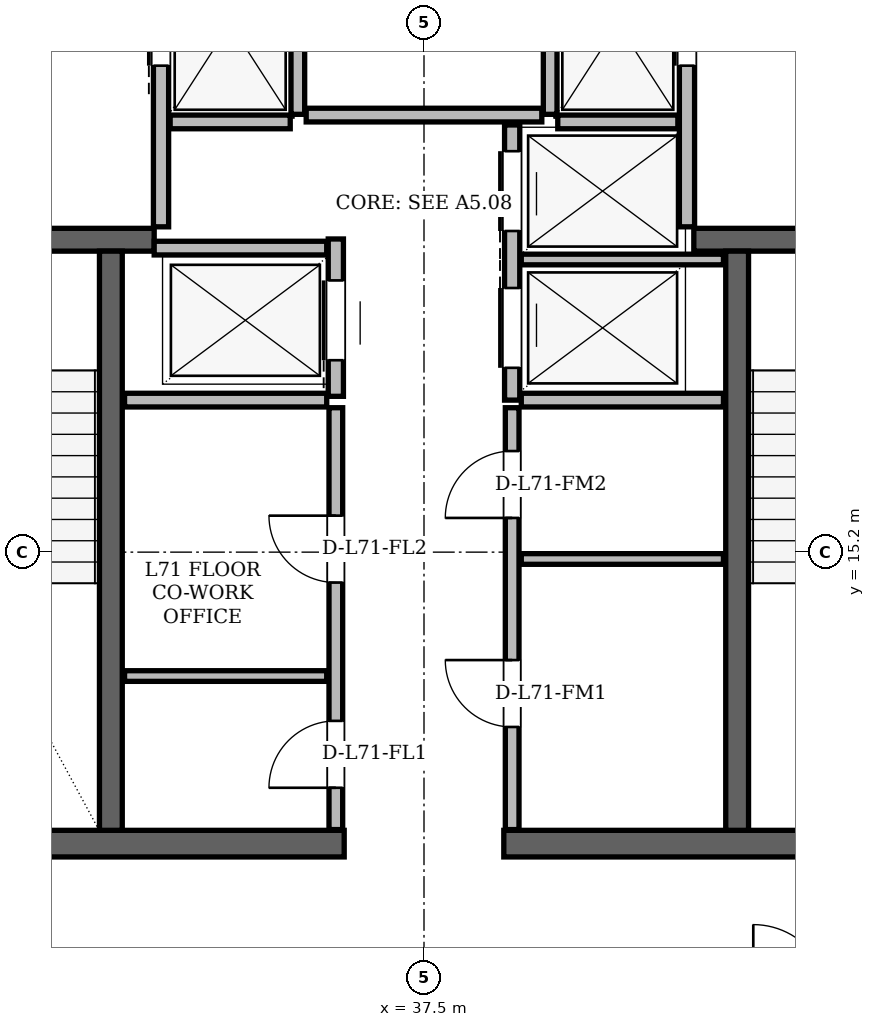
"""IFC4 building model, lengths in metres.
Left out: names, types, materials, properties, quantities, classifications, styles, units other than length and angle.
Written with IfcOpenShell. Run it as: python <this file> out.ifc"""

import sys

from ifc_helpers import new_model, si_unit, direction, frame, frame_2d, origin, place, context, subcontext, project, spatial, rectangle, extrude, element, fill, save


model = new_model("IFC4")
c1 = context("Model", 3, precision=1e-05, world=origin(), true_north=direction((0.0, 1.0)))
c2 = subcontext(c1, "Body", "Model", "MODEL_VIEW")
j1 = project(units=[si_unit("LENGTHUNIT", "METRE"), si_unit("PLANEANGLEUNIT", "RADIAN")], contexts=[c1])
p1 = place(None, origin())
s1 = spatial("IfcSite", under=j1, at=p1, CompositionType="ELEMENT")
p2 = place(p1, origin())
s2 = spatial("IfcBuilding", under=s1, at=p2, CompositionType="ELEMENT")
p3 = place(p2, frame((0.0, 0.0, 269.4)))
s3 = spatial("IfcBuildingStorey", under=s2, at=p3, CompositionType="ELEMENT", Elevation=269.4)
for number, where, z_axis, x_axis in (
    (1, (29.35, 11.365, 0.0), (0.0, 0.0, 1.0), (1.0, 0.0, 0.0)),
    (2, (38.55, 11.365, 0.0), (0.0, 0.0, 1.0), (1.0, 0.0, 0.0)),
):
    element("IfcWall", number, at=place(p3, frame(where, z_axis=z_axis, x_axis=x_axis)), inside=s3, PredefinedType="SHEAR", context=c2, shape_type="SweptSolid", body=[
        extrude(rectangle(XDim=7.1, YDim=0.35, at=frame_2d((3.55, 0.0))), origin(), (0.0, 0.0, 1.0), 3.68),
    ])
p4 = place(p3, frame((29.94, 19.31, 0.0), z_axis=(0.0, 0.0, 1.0), x_axis=(1.0, 0.0, 0.0)))
e3 = element("IfcWall", 3, at=p4, inside=s3, PredefinedType="SHEAR", context=c2, shape_type="SweptSolid", body=[
    extrude(rectangle(XDim=4.01, YDim=0.3, at=frame_2d((2.005, 0.0))), origin(), (0.0, 0.0, 1.0), 3.68),
])
p5 = place(p4, frame((1.01, 0.0, 0.0)))
e4 = element("IfcOpeningElement", 4, at=p5, cuts=e3, PredefinedType="OPENING", context=c2, shape_type="SweptSolid", body=[
    extrude(rectangle(XDim=1.4, YDim=2.2, at=frame_2d((0.7, 1.1))), frame((0.0, 0.15, 0.0), z_axis=(0.0, -1.0, 0.0), x_axis=(1.0, 0.0, 0.0)), (0.0, 0.0, 1.0), 0.3),
])
p6 = place(p3, frame((41.05, 19.31, 0.0), z_axis=(0.0, 0.0, 1.0), x_axis=(1.0, 0.0, 0.0)))
e5 = element("IfcWall", 5, at=p6, inside=s3, PredefinedType="SHEAR", context=c2, shape_type="SweptSolid", body=[
    extrude(rectangle(XDim=4.01, YDim=0.3, at=frame_2d((2.005, 0.0))), origin(), (0.0, 0.0, 1.0), 3.68),
])
p7 = place(p6, frame((1.6, 0.0, 0.0)))
e6 = element("IfcOpeningElement", 6, at=p7, cuts=e5, PredefinedType="OPENING", context=c2, shape_type="SweptSolid", body=[
    extrude(rectangle(XDim=1.4, YDim=2.2, at=frame_2d((0.7, 1.1))), frame((0.0, 0.15, 0.0), z_axis=(0.0, -1.0, 0.0), x_axis=(1.0, 0.0, 0.0)), (0.0, 0.0, 1.0), 0.3),
])
for number, where, z_axis, x_axis in (
    (7, (33.38, 11.54, 0.0), (0.0, 0.0, 1.0), (0.0, 1.0, 0.0)),
    (8, (41.62, 11.54, 0.0), (0.0, 0.0, 1.0), (0.0, 1.0, 0.0)),
):
    element("IfcWall", number, at=place(p3, frame(where, z_axis=z_axis, x_axis=x_axis)), inside=s3, PredefinedType="SHEAR", context=c2, shape_type="SweptSolid", body=[
        extrude(rectangle(XDim=7.62, YDim=0.3, at=frame_2d((3.81, 0.0))), origin(), (0.0, 0.0, 1.0), 3.68),
    ])
p8 = place(p3, frame((58.572, 10.733, 0.0), z_axis=(0.0, 0.0, 1.0), x_axis=(-0.500001430823, 0.866024577697, 0.0)))
e9 = element("IfcWall", 9, at=p8, inside=s3, PredefinedType="SOLIDWALL", context=c2, shape_type="SweptSolid", body=[
    extrude(rectangle(XDim=37.296, YDim=0.29, at=frame_2d((18.648, 0.0))), origin(), (0.0, 0.0, 1.0), 3.058),
])
p9 = place(p8, frame((8.454, 0.0, 0.0)))
e10 = element("IfcOpeningElement", 10, at=p9, cuts=e9, PredefinedType="OPENING", context=c2, shape_type="SweptSolid", body=[
    extrude(rectangle(XDim=1.5, YDim=2.2, at=frame_2d((0.75, 1.1))), frame((0.0, 0.145, 0.0), z_axis=(0.0, -1.0, 0.0), x_axis=(1.0, 0.0, 0.0)), (0.0, 0.0, 1.0), 0.29),
])
p10 = place(p8, frame((28.796, 0.0, 0.0)))
e11 = element("IfcOpeningElement", 11, at=p10, cuts=e9, PredefinedType="OPENING", context=c2, shape_type="SweptSolid", body=[
    extrude(rectangle(XDim=1.5, YDim=2.2, at=frame_2d((0.75, 1.1))), frame((0.0, 0.145, 0.0), z_axis=(0.0, -1.0, 0.0), x_axis=(1.0, 0.0, 0.0)), (0.0, 0.0, 1.0), 0.29),
])
p11 = place(p8, frame((0.77, 0.0, 0.85)))
e12 = element("IfcOpeningElement", 12, at=p11, cuts=e9, PredefinedType="OPENING", context=c2, shape_type="SweptSolid", body=[
    extrude(rectangle(XDim=1.2, YDim=1.48, at=frame_2d((0.6, 0.74))), frame((0.0, 0.145, 0.0), z_axis=(0.0, -1.0, 0.0), x_axis=(1.0, 0.0, 0.0)), (0.0, 0.0, 1.0), 0.29),
])
p12 = place(p8, frame((2.285, 0.0, 0.85)))
e13 = element("IfcOpeningElement", 13, at=p12, cuts=e9, PredefinedType="OPENING", context=c2, shape_type="SweptSolid", body=[
    extrude(rectangle(XDim=1.2, YDim=1.48, at=frame_2d((0.6, 0.74))), frame((0.0, 0.145, 0.0), z_axis=(0.0, -1.0, 0.0), x_axis=(1.0, 0.0, 0.0)), (0.0, 0.0, 1.0), 0.29),
])
p13 = place(p8, frame((6.772, 0.0, 0.85)))
e14 = element("IfcOpeningElement", 14, at=p13, cuts=e9, PredefinedType="OPENING", context=c2, shape_type="SweptSolid", body=[
    extrude(rectangle(XDim=1.2, YDim=1.48, at=frame_2d((0.6, 0.74))), frame((0.0, 0.145, 0.0), z_axis=(0.0, -1.0, 0.0), x_axis=(1.0, 0.0, 0.0)), (0.0, 0.0, 1.0), 0.29),
])
p14 = place(p8, frame((12.682, 0.0, 0.85)))
e15 = element("IfcOpeningElement", 15, at=p14, cuts=e9, PredefinedType="OPENING", context=c2, shape_type="SweptSolid", body=[
    extrude(rectangle(XDim=3.0, YDim=2.098, at=frame_2d((1.5, 1.049))), frame((0.0, 0.145, 0.0), z_axis=(0.0, -1.0, 0.0), x_axis=(1.0, 0.0, 0.0)), (0.0, 0.0, 1.0), 0.29),
])
p15 = place(p8, frame((17.842, 0.0, 0.85)))
e16 = element("IfcOpeningElement", 16, at=p15, cuts=e9, PredefinedType="OPENING", context=c2, shape_type="SweptSolid", body=[
    extrude(rectangle(XDim=2.6, YDim=1.95, at=frame_2d((1.3, 0.975))), frame((0.0, 0.145, 0.0), z_axis=(0.0, -1.0, 0.0), x_axis=(1.0, 0.0, 0.0)), (0.0, 0.0, 1.0), 0.29),
])
p16 = place(p8, frame((35.217, 0.0, 0.85)))
e17 = element("IfcOpeningElement", 17, at=p16, cuts=e9, PredefinedType="OPENING", context=c2, shape_type="SweptSolid", body=[
    extrude(rectangle(XDim=1.2, YDim=1.48, at=frame_2d((0.6, 0.74))), frame((0.0, 0.145, 0.0), z_axis=(0.0, -1.0, 0.0), x_axis=(1.0, 0.0, 0.0)), (0.0, 0.0, 1.0), 0.29),
])
p17 = place(p8, frame((33.737, 0.0, 0.85)))
e18 = element("IfcOpeningElement", 18, at=p17, cuts=e9, PredefinedType="OPENING", context=c2, shape_type="SweptSolid", body=[
    extrude(rectangle(XDim=1.2, YDim=1.48, at=frame_2d((0.6, 0.74))), frame((0.0, 0.145, 0.0), z_axis=(0.0, -1.0, 0.0), x_axis=(1.0, 0.0, 0.0)), (0.0, 0.0, 1.0), 0.29),
])
p18 = place(p8, frame((22.775, 0.0, 0.85)))
e19 = element("IfcOpeningElement", 19, at=p18, cuts=e9, PredefinedType="OPENING", context=c2, shape_type="SweptSolid", body=[
    extrude(rectangle(XDim=1.2, YDim=1.48, at=frame_2d((0.6, 0.74))), frame((0.0, 0.145, 0.0), z_axis=(0.0, -1.0, 0.0), x_axis=(1.0, 0.0, 0.0)), (0.0, 0.0, 1.0), 0.29),
])
p19 = place(p8, frame((31.663, 0.0, 0.85)))
e20 = element("IfcOpeningElement", 20, at=p19, cuts=e9, PredefinedType="OPENING", context=c2, shape_type="SweptSolid", body=[
    extrude(rectangle(XDim=1.2, YDim=1.48, at=frame_2d((0.6, 0.74))), frame((0.0, 0.145, 0.0), z_axis=(0.0, -1.0, 0.0), x_axis=(1.0, 0.0, 0.0)), (0.0, 0.0, 1.0), 0.29),
])
p20 = place(p3, frame((35.076, 43.032, 0.0), z_axis=(0.0, 0.0, 1.0), x_axis=(-0.500001430823, -0.866024577697, 0.0)))
e21 = element("IfcWall", 21, at=p20, inside=s3, PredefinedType="SOLIDWALL", context=c2, shape_type="SweptSolid", body=[
    extrude(rectangle(XDim=37.296, YDim=0.29, at=frame_2d((18.648, 0.0))), origin(), (0.0, 0.0, 1.0), 3.058),
])
p21 = place(p20, frame((8.244, 0.0, 0.0)))
e22 = element("IfcOpeningElement", 22, at=p21, cuts=e21, PredefinedType="OPENING", context=c2, shape_type="SweptSolid", body=[
    extrude(rectangle(XDim=1.5, YDim=2.2, at=frame_2d((0.75, 1.1))), frame((0.0, 0.145, 0.0), z_axis=(0.0, -1.0, 0.0), x_axis=(1.0, 0.0, 0.0)), (0.0, 0.0, 1.0), 0.29),
])
p22 = place(p20, frame((29.006, 0.0, 0.0)))
e23 = element("IfcOpeningElement", 23, at=p22, cuts=e21, PredefinedType="OPENING", context=c2, shape_type="SweptSolid", body=[
    extrude(rectangle(XDim=1.5, YDim=2.2, at=frame_2d((0.75, 1.1))), frame((0.0, 0.145, 0.0), z_axis=(0.0, -1.0, 0.0), x_axis=(1.0, 0.0, 0.0)), (0.0, 0.0, 1.0), 0.29),
])
p23 = place(p20, frame((22.292, 0.0, 0.85)))
e24 = element("IfcOpeningElement", 24, at=p23, cuts=e21, PredefinedType="OPENING", context=c2, shape_type="SweptSolid", body=[
    extrude(rectangle(XDim=2.6, YDim=1.95, at=frame_2d((1.3, 0.975))), frame((0.0, 0.145, 0.0), z_axis=(0.0, -1.0, 0.0), x_axis=(1.0, 0.0, 0.0)), (0.0, 0.0, 1.0), 0.29),
])
p24 = place(p20, frame((33.833, 0.0, 0.85)))
e25 = element("IfcOpeningElement", 25, at=p24, cuts=e21, PredefinedType="OPENING", context=c2, shape_type="SweptSolid", body=[
    extrude(rectangle(XDim=2.4, YDim=1.9, at=frame_2d((1.2, 0.95))), frame((0.0, 0.145, 0.0), z_axis=(0.0, -1.0, 0.0), x_axis=(1.0, 0.0, 0.0)), (0.0, 0.0, 1.0), 0.29),
])
p25 = place(p20, frame((12.154, 0.0, 0.85)))
e26 = element("IfcOpeningElement", 26, at=p25, cuts=e21, PredefinedType="OPENING", context=c2, shape_type="SweptSolid", body=[
    extrude(rectangle(XDim=1.2, YDim=1.48, at=frame_2d((0.6, 0.74))), frame((0.0, 0.145, 0.0), z_axis=(0.0, -1.0, 0.0), x_axis=(1.0, 0.0, 0.0)), (0.0, 0.0, 1.0), 0.29),
])
p26 = place(p20, frame((16.612, 0.0, 0.85)))
e27 = element("IfcOpeningElement", 27, at=p26, cuts=e21, PredefinedType="OPENING", context=c2, shape_type="SweptSolid", body=[
    extrude(rectangle(XDim=1.6, YDim=1.7, at=frame_2d((0.8, 0.85))), frame((0.0, 0.145, 0.0), z_axis=(0.0, -1.0, 0.0), x_axis=(1.0, 0.0, 0.0)), (0.0, 0.0, 1.0), 0.29),
])
p27 = place(p20, frame((2.665, 0.0, 0.85)))
e28 = element("IfcOpeningElement", 28, at=p27, cuts=e21, PredefinedType="OPENING", context=c2, shape_type="SweptSolid", body=[
    extrude(rectangle(XDim=2.0, YDim=1.8, at=frame_2d((1.0, 0.9))), frame((0.0, 0.145, 0.0), z_axis=(0.0, -1.0, 0.0), x_axis=(1.0, 0.0, 0.0)), (0.0, 0.0, 1.0), 0.29),
])
p28 = place(p3, frame((34.04, 19.48, 0.0), z_axis=(0.0, 0.0, 1.0), x_axis=(0.0, 1.0, 0.0)))
e29 = element("IfcWall", 29, at=p28, inside=s3, PredefinedType="PARTITIONING", context=c2, shape_type="SweptSolid", body=[
    extrude(rectangle(XDim=4.5, YDim=0.2, at=frame_2d((2.25, 0.0))), origin(), (0.0, 0.0, 1.0), 3.68),
])
p29 = place(p28, frame((2.12, 0.0, 0.0)))
e30 = element("IfcOpeningElement", 30, at=p29, cuts=e29, PredefinedType="OPENING", context=c2, shape_type="SweptSolid", body=[
    extrude(rectangle(XDim=1.1, YDim=2.2, at=frame_2d((0.55, 1.1))), frame((0.0, 0.1, 0.0), z_axis=(0.0, -1.0, 0.0), x_axis=(1.0, 0.0, 0.0)), (0.0, 0.0, 1.0), 0.2),
])
p30 = place(p3, frame((35.84, 20.96, 0.0), z_axis=(0.0, 0.0, 1.0), x_axis=(0.0, 1.0, 0.0)))
e31 = element("IfcWall", 31, at=p30, inside=s3, PredefinedType="PARTITIONING", context=c2, shape_type="SweptSolid", body=[
    extrude(rectangle(XDim=3.02, YDim=0.18, at=frame_2d((1.51, 0.0))), origin(), (0.0, 0.0, 1.0), 3.68),
])
p31 = place(p3, frame((34.16, 20.86, 0.0), z_axis=(0.0, 0.0, 1.0), x_axis=(1.0, 0.0, 0.0)))
e32 = element("IfcWall", 32, at=p31, inside=s3, PredefinedType="PARTITIONING", context=c2, shape_type="SweptSolid", body=[
    extrude(rectangle(XDim=1.58, YDim=0.18, at=frame_2d((0.79, 0.0))), origin(), (0.0, 0.0, 1.0), 3.68),
])
p32 = place(p3, frame((40.96, 19.48, 0.0), z_axis=(0.0, 0.0, 1.0), x_axis=(0.0, 1.0, 0.0)))
e33 = element("IfcWall", 33, at=p32, inside=s3, PredefinedType="PARTITIONING", context=c2, shape_type="SweptSolid", body=[
    extrude(rectangle(XDim=4.5, YDim=0.2, at=frame_2d((2.25, 0.0))), origin(), (0.0, 0.0, 1.0), 3.68),
])
p33 = place(p32, frame((2.12, 0.0, 0.0)))
e34 = element("IfcOpeningElement", 34, at=p33, cuts=e33, PredefinedType="OPENING", context=c2, shape_type="SweptSolid", body=[
    extrude(rectangle(XDim=1.1, YDim=2.2, at=frame_2d((0.55, 1.1))), frame((0.0, 0.1, 0.0), z_axis=(0.0, -1.0, 0.0), x_axis=(1.0, 0.0, 0.0)), (0.0, 0.0, 1.0), 0.2),
])
p34 = place(p3, frame((39.16, 20.96, 0.0), z_axis=(0.0, 0.0, 1.0), x_axis=(0.0, 1.0, 0.0)))
e35 = element("IfcWall", 35, at=p34, inside=s3, PredefinedType="PARTITIONING", context=c2, shape_type="SweptSolid", body=[
    extrude(rectangle(XDim=3.02, YDim=0.18, at=frame_2d((1.51, 0.0))), origin(), (0.0, 0.0, 1.0), 3.68),
])
p35 = place(p3, frame((39.26, 20.86, 0.0), z_axis=(0.0, 0.0, 1.0), x_axis=(1.0, 0.0, 0.0)))
e36 = element("IfcWall", 36, at=p35, inside=s3, PredefinedType="PARTITIONING", context=c2, shape_type="SweptSolid", body=[
    extrude(rectangle(XDim=1.58, YDim=0.18, at=frame_2d((0.79, 0.0))), origin(), (0.0, 0.0, 1.0), 3.68),
])
p36 = place(p3, frame((36.34, 17.25, 0.0), z_axis=(0.0, 0.0, 1.0), x_axis=(0.0, 1.0, 0.0)))
e37 = element("IfcWall", 37, at=p36, inside=s3, PredefinedType="PARTITIONING", context=c2, shape_type="SweptSolid", body=[
    extrude(rectangle(XDim=2.07, YDim=0.2, at=frame_2d((1.035, 0.0))), origin(), (0.0, 0.0, 1.0), 3.68),
])
p37 = place(p36, frame((0.475, 0.0, 0.0)))
e38 = element("IfcOpeningElement", 38, at=p37, cuts=e37, PredefinedType="OPENING", context=c2, shape_type="SweptSolid", body=[
    extrude(rectangle(XDim=1.05, YDim=2.15, at=frame_2d((0.525, 1.075))), frame((0.0, 0.1, 0.0), z_axis=(0.0, -1.0, 0.0), x_axis=(1.0, 0.0, 0.0)), (0.0, 0.0, 1.0), 0.2),
])
p38 = place(p3, frame((33.95, 19.2, 0.0), z_axis=(0.0, 0.0, 1.0), x_axis=(1.0, 0.0, 0.0)))
e39 = element("IfcWall", 39, at=p38, inside=s3, PredefinedType="PARTITIONING", context=c2, shape_type="SweptSolid", body=[
    extrude(rectangle(XDim=2.27, YDim=0.18, at=frame_2d((1.135, 0.0))), origin(), (0.0, 0.0, 1.0), 3.68),
])
p39 = place(p3, frame((33.56, 17.2, 0.0), z_axis=(0.0, 0.0, 1.0), x_axis=(1.0, 0.0, 0.0)))
e40 = element("IfcWall", 40, at=p39, inside=s3, PredefinedType="PARTITIONING", context=c2, shape_type="SweptSolid", body=[
    extrude(rectangle(XDim=2.66, YDim=0.18, at=frame_2d((1.33, 0.0))), origin(), (0.0, 0.0, 1.0), 3.68),
])
p40 = place(p3, frame((36.34, 11.55, 0.0), z_axis=(0.0, 0.0, 1.0), x_axis=(0.0, 1.0, 0.0)))
e41 = element("IfcWall", 41, at=p40, inside=s3, PredefinedType="PARTITIONING", context=c2, shape_type="SweptSolid", body=[
    extrude(rectangle(XDim=5.55, YDim=0.18, at=frame_2d((2.775, 0.0))), origin(), (0.0, 0.0, 1.0), 3.68),
])
p41 = place(p40, frame((0.55, 0.0, 0.0)))
e42 = element("IfcOpeningElement", 42, at=p41, cuts=e41, PredefinedType="OPENING", context=c2, shape_type="SweptSolid", body=[
    extrude(rectangle(XDim=0.88, YDim=2.08, at=frame_2d((0.44, 1.04))), frame((0.0, 0.09, 0.0), z_axis=(0.0, -1.0, 0.0), x_axis=(1.0, 0.0, 0.0)), (0.0, 0.0, 1.0), 0.18),
])
p42 = place(p40, frame((3.25, 0.0, 0.0)))
e43 = element("IfcOpeningElement", 43, at=p42, cuts=e41, PredefinedType="OPENING", context=c2, shape_type="SweptSolid", body=[
    extrude(rectangle(XDim=0.88, YDim=2.08, at=frame_2d((0.44, 1.04))), frame((0.0, 0.09, 0.0), z_axis=(0.0, -1.0, 0.0), x_axis=(1.0, 0.0, 0.0)), (0.0, 0.0, 1.0), 0.18),
])
p43 = place(p3, frame((33.56, 13.57, 0.0), z_axis=(0.0, 0.0, 1.0), x_axis=(1.0, 0.0, 0.0)))
e44 = element("IfcWall", 44, at=p43, inside=s3, PredefinedType="PARTITIONING", context=c2, shape_type="SweptSolid", body=[
    extrude(rectangle(XDim=2.66, YDim=0.14, at=frame_2d((1.33, 0.0))), origin(), (0.0, 0.0, 1.0), 3.68),
])
p44 = place(p3, frame((38.66, 17.2, 0.0), z_axis=(0.0, 0.0, 1.0), x_axis=(0.0, 1.0, 0.0)))
e45 = element("IfcWall", 45, at=p44, inside=s3, PredefinedType="PARTITIONING", context=c2, shape_type="SweptSolid", body=[
    extrude(rectangle(XDim=3.62, YDim=0.2, at=frame_2d((1.81, 0.0))), origin(), (0.0, 0.0, 1.0), 3.68),
])
p45 = place(p44, frame((0.425, 0.0, 0.0)))
e46 = element("IfcOpeningElement", 46, at=p45, cuts=e45, PredefinedType="OPENING", context=c2, shape_type="SweptSolid", body=[
    extrude(rectangle(XDim=1.05, YDim=2.15, at=frame_2d((0.525, 1.075))), frame((0.0, 0.1, 0.0), z_axis=(0.0, -1.0, 0.0), x_axis=(1.0, 0.0, 0.0)), (0.0, 0.0, 1.0), 0.2),
])
p46 = place(p44, frame((2.225, 0.0, 0.0)))
e47 = element("IfcOpeningElement", 47, at=p46, cuts=e45, PredefinedType="OPENING", context=c2, shape_type="SweptSolid", body=[
    extrude(rectangle(XDim=1.05, YDim=2.15, at=frame_2d((0.525, 1.075))), frame((0.0, 0.1, 0.0), z_axis=(0.0, -1.0, 0.0), x_axis=(1.0, 0.0, 0.0)), (0.0, 0.0, 1.0), 0.2),
])
p47 = place(p3, frame((38.78, 17.2, 0.0), z_axis=(0.0, 0.0, 1.0), x_axis=(1.0, 0.0, 0.0)))
e48 = element("IfcWall", 48, at=p47, inside=s3, PredefinedType="PARTITIONING", context=c2, shape_type="SweptSolid", body=[
    extrude(rectangle(XDim=2.66, YDim=0.18, at=frame_2d((1.33, 0.0))), origin(), (0.0, 0.0, 1.0), 3.68),
])
p48 = place(p3, frame((38.78, 19.05, 0.0), z_axis=(0.0, 0.0, 1.0), x_axis=(1.0, 0.0, 0.0)))
e49 = element("IfcWall", 49, at=p48, inside=s3, PredefinedType="PARTITIONING", context=c2, shape_type="SweptSolid", body=[
    extrude(rectangle(XDim=2.66, YDim=0.14, at=frame_2d((1.33, 0.0))), origin(), (0.0, 0.0, 1.0), 3.68),
])
p49 = place(p3, frame((38.66, 11.55, 0.0), z_axis=(0.0, 0.0, 1.0), x_axis=(0.0, 1.0, 0.0)))
e50 = element("IfcWall", 50, at=p49, inside=s3, PredefinedType="PARTITIONING", context=c2, shape_type="SweptSolid", body=[
    extrude(rectangle(XDim=5.55, YDim=0.18, at=frame_2d((2.775, 0.0))), origin(), (0.0, 0.0, 1.0), 3.68),
])
p50 = place(p49, frame((1.35, 0.0, 0.0)))
e51 = element("IfcOpeningElement", 51, at=p50, cuts=e50, PredefinedType="OPENING", context=c2, shape_type="SweptSolid", body=[
    extrude(rectangle(XDim=0.88, YDim=2.08, at=frame_2d((0.44, 1.04))), frame((0.0, 0.09, 0.0), z_axis=(0.0, -1.0, 0.0), x_axis=(1.0, 0.0, 0.0)), (0.0, 0.0, 1.0), 0.18),
])
p51 = place(p49, frame((4.1, 0.0, 0.0)))
e52 = element("IfcOpeningElement", 52, at=p51, cuts=e50, PredefinedType="OPENING", context=c2, shape_type="SweptSolid", body=[
    extrude(rectangle(XDim=0.88, YDim=2.08, at=frame_2d((0.44, 1.04))), frame((0.0, 0.09, 0.0), z_axis=(0.0, -1.0, 0.0), x_axis=(1.0, 0.0, 0.0)), (0.0, 0.0, 1.0), 0.18),
])
p52 = place(p3, frame((38.78, 15.11, 0.0), z_axis=(0.0, 0.0, 1.0), x_axis=(1.0, 0.0, 0.0)))
e53 = element("IfcWall", 53, at=p52, inside=s3, PredefinedType="PARTITIONING", context=c2, shape_type="SweptSolid", body=[
    extrude(rectangle(XDim=2.66, YDim=0.14, at=frame_2d((1.33, 0.0))), origin(), (0.0, 0.0, 1.0), 3.68),
])
p53 = place(p3, frame((35.95, 20.95, 0.0), z_axis=(0.0, 0.0, 1.0), x_axis=(1.0, 0.0, 0.0)))
e54 = element("IfcWall", 54, at=p53, inside=s3, PredefinedType="PARTITIONING", context=c2, shape_type="SweptSolid", body=[
    extrude(rectangle(XDim=3.1, YDim=0.18, at=frame_2d((1.55, 0.0))), origin(), (0.0, 0.0, 1.0), 3.68),
])
p54 = place(p41, origin())
e55 = element("IfcDoor", 55, at=p54, inside=s3, OperationType="SINGLE_SWING_LEFT", PredefinedType="DOOR", context=c2, shape_type="SweptSolid", body=[
    extrude(rectangle(XDim=0.88, YDim=2.08, at=frame_2d((0.44, 1.04))), frame((0.0, 0.025, 0.0), z_axis=(0.0, -1.0, 0.0), x_axis=(1.0, 0.0, 0.0)), (0.0, 0.0, 1.0), 0.05),
])
fill(e42, e55)
p55 = place(p42, origin())
e56 = element("IfcDoor", 56, at=p55, inside=s3, OperationType="SINGLE_SWING_RIGHT", PredefinedType="DOOR", context=c2, shape_type="SweptSolid", body=[
    extrude(rectangle(XDim=0.88, YDim=2.08, at=frame_2d((0.44, 1.04))), frame((0.0, 0.025, 0.0), z_axis=(0.0, -1.0, 0.0), x_axis=(1.0, 0.0, 0.0)), (0.0, 0.0, 1.0), 0.05),
])
fill(e43, e56)
p56 = place(p50, origin())
e57 = element("IfcDoor", 57, at=p56, inside=s3, OperationType="SINGLE_SWING_RIGHT", PredefinedType="DOOR", context=c2, shape_type="SweptSolid", body=[
    extrude(rectangle(XDim=0.88, YDim=2.08, at=frame_2d((0.44, 1.04))), frame((0.0, 0.025, 0.0), z_axis=(0.0, -1.0, 0.0), x_axis=(1.0, 0.0, 0.0)), (0.0, 0.0, 1.0), 0.05),
])
fill(e51, e57)
p57 = place(p51, origin())
e58 = element("IfcDoor", 58, at=p57, inside=s3, OperationType="SINGLE_SWING_LEFT", PredefinedType="DOOR", context=c2, shape_type="SweptSolid", body=[
    extrude(rectangle(XDim=0.88, YDim=2.08, at=frame_2d((0.44, 1.04))), frame((0.0, 0.025, 0.0), z_axis=(0.0, -1.0, 0.0), x_axis=(1.0, 0.0, 0.0)), (0.0, 0.0, 1.0), 0.05),
])
fill(e52, e58)
p58 = place(p29, origin())
e59 = element("IfcDoor", 59, at=p58, inside=s3, OperationType="SLIDING_TO_LEFT", PredefinedType="DOOR", context=c2, shape_type="SweptSolid", body=[
    extrude(rectangle(XDim=1.1, YDim=2.2, at=frame_2d((0.55, 1.1))), frame((0.0, 0.025, 0.0), z_axis=(0.0, -1.0, 0.0), x_axis=(1.0, 0.0, 0.0)), (0.0, 0.0, 1.0), 0.05),
])
fill(e30, e59)
p59 = place(p33, origin())
e60 = element("IfcDoor", 60, at=p59, inside=s3, OperationType="SLIDING_TO_RIGHT", PredefinedType="DOOR", context=c2, shape_type="SweptSolid", body=[
    extrude(rectangle(XDim=1.1, YDim=2.2, at=frame_2d((0.55, 1.1))), frame((0.0, 0.025, 0.0), z_axis=(0.0, -1.0, 0.0), x_axis=(1.0, 0.0, 0.0)), (0.0, 0.0, 1.0), 0.05),
])
fill(e34, e60)
p60 = place(p37, origin())
e61 = element("IfcDoor", 61, at=p60, inside=s3, OperationType="SLIDING_TO_LEFT", PredefinedType="DOOR", context=c2, shape_type="SweptSolid", body=[
    extrude(rectangle(XDim=1.05, YDim=2.15, at=frame_2d((0.525, 1.075))), frame((0.0, 0.025, 0.0), z_axis=(0.0, -1.0, 0.0), x_axis=(1.0, 0.0, 0.0)), (0.0, 0.0, 1.0), 0.05),
])
fill(e38, e61)
p61 = place(p45, origin())
e62 = element("IfcDoor", 62, at=p61, inside=s3, OperationType="SLIDING_TO_RIGHT", PredefinedType="DOOR", context=c2, shape_type="SweptSolid", body=[
    extrude(rectangle(XDim=1.05, YDim=2.15, at=frame_2d((0.525, 1.075))), frame((0.0, 0.025, 0.0), z_axis=(0.0, -1.0, 0.0), x_axis=(1.0, 0.0, 0.0)), (0.0, 0.0, 1.0), 0.05),
])
fill(e46, e62)
p62 = place(p46, origin())
e63 = element("IfcDoor", 63, at=p62, inside=s3, OperationType="SLIDING_TO_LEFT", PredefinedType="DOOR", context=c2, shape_type="SweptSolid", body=[
    extrude(rectangle(XDim=1.05, YDim=2.15, at=frame_2d((0.525, 1.075))), frame((0.0, 0.025, 0.0), z_axis=(0.0, -1.0, 0.0), x_axis=(1.0, 0.0, 0.0)), (0.0, 0.0, 1.0), 0.05),
])
fill(e47, e63)
save(model, sys.argv[1])
